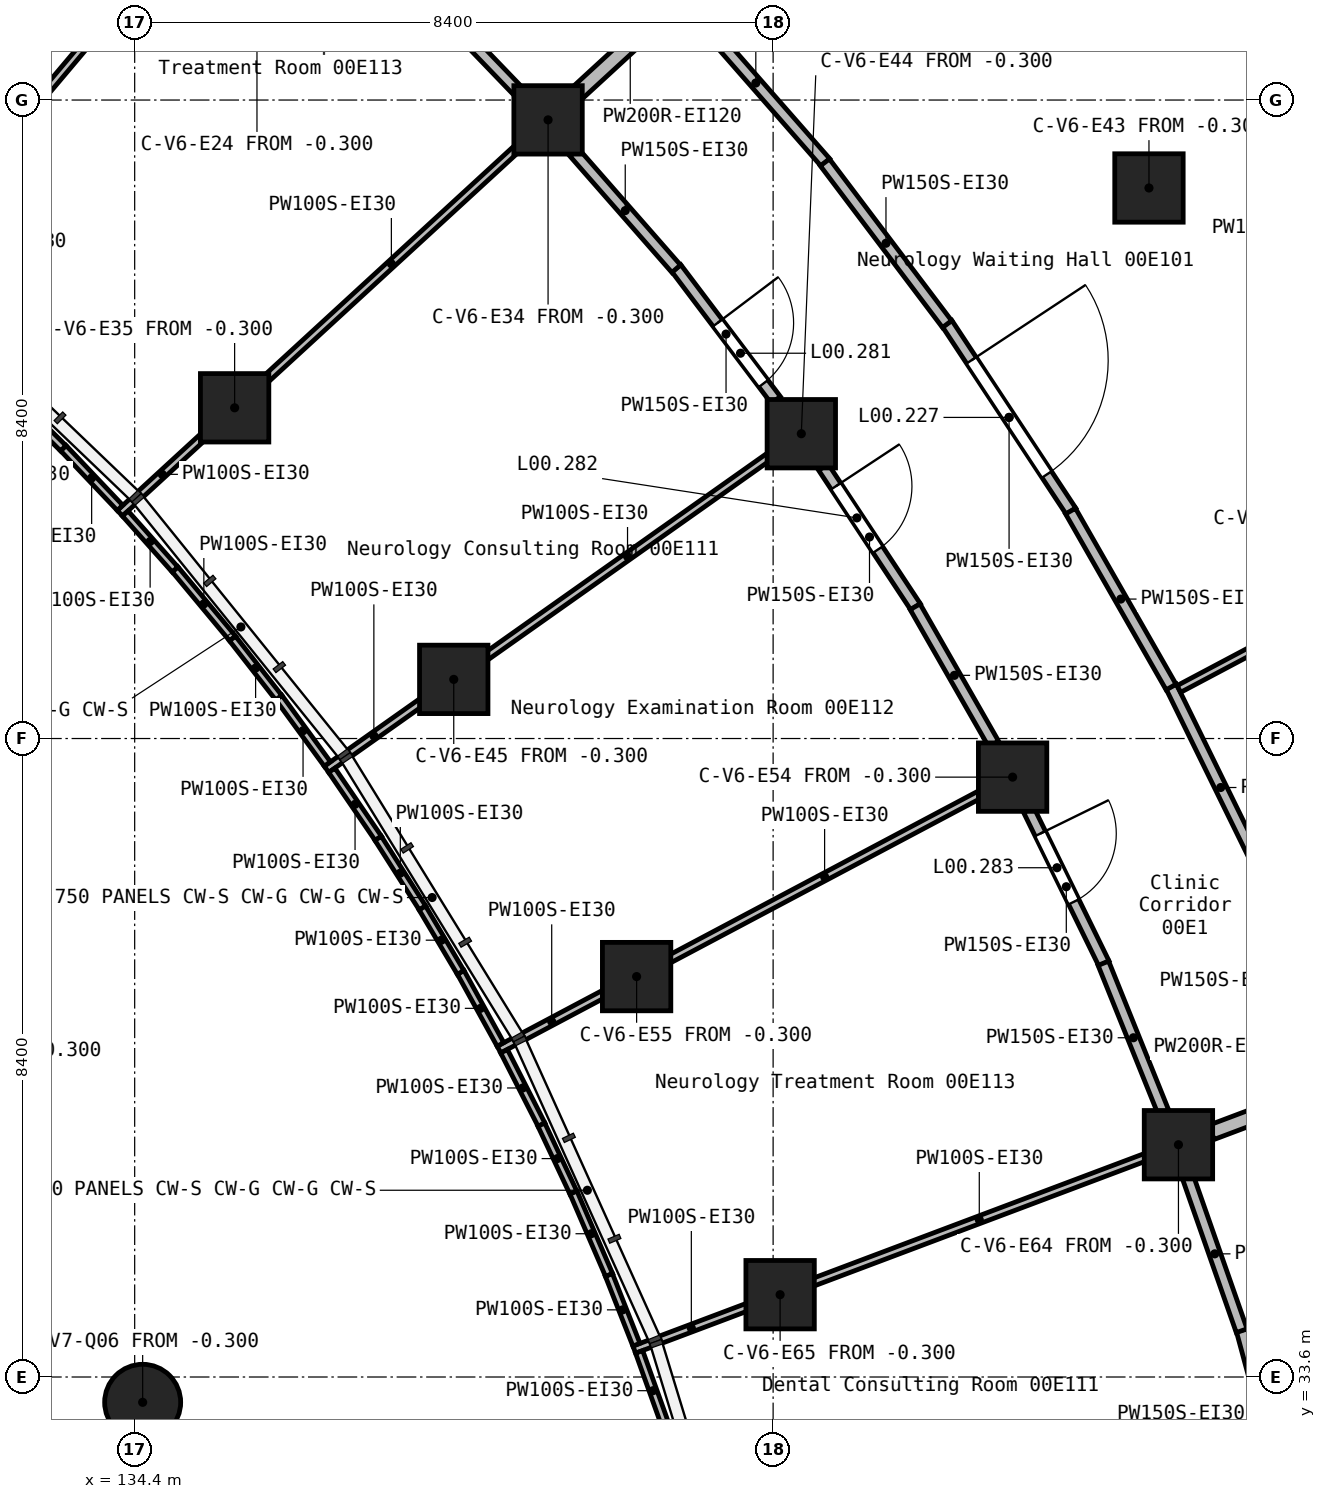
"""IFC4 building model, lengths in metres.
Left out: names, types, materials, properties, quantities, classifications, styles, units other than length and angle.
Written with IfcOpenShell. Run it as: python <this file> out.ifc"""

import sys

from ifc_helpers import new_model, si_unit, direction, frame, frame_2d, origin, origin_2d, place, context, subcontext, project, spatial, rectangle, circle, extrude, element, fill, save


model = new_model("IFC4")
c1 = context("Model", 3, precision=1e-05, world=origin(), true_north=direction((0.0, 1.0)))
c2 = subcontext(c1, "Body", "Model", "MODEL_VIEW")
j1 = project(units=[si_unit("LENGTHUNIT", "METRE"), si_unit("PLANEANGLEUNIT", "RADIAN")], contexts=[c1])
p1 = place(None, origin())
s1 = spatial("IfcSite", under=j1, at=p1, CompositionType="ELEMENT")
p2 = place(p1, origin())
s2 = spatial("IfcBuilding", under=s1, at=p2, CompositionType="ELEMENT")
p3 = place(p2, origin())
s3 = spatial("IfcBuildingStorey", under=s2, at=p3, CompositionType="ELEMENT", Elevation=0.0)
p4 = place(p3, frame((134.505, 33.267, -0.3), z_axis=(0.0, 0.0, 1.0), x_axis=(1.0, 0.0, 0.0)))
e1 = element("IfcColumn", 1, at=p4, inside=s3, PredefinedType="COLUMN", context=c2, shape_type="SweptSolid", body=[
    extrude(circle(Radius=0.5, at=origin_2d()), origin(), (0.0, 0.0, 1.0), 5.7),
])
for number, where, z_axis, x_axis in (
    (2, (135.715, 46.351, -0.3), (0.0, 0.0, 1.0), (1.0, 0.0, 0.0)),
    (3, (138.598, 42.778, -0.3), (0.0, 0.0, 1.0), (1.0, 0.0, 0.0)),
    (4, (139.839, 50.139, -0.3), (0.0, 0.0, 1.0), (1.0, 0.0, 0.0)),
    (5, (141.004, 38.868, -0.3), (0.0, 0.0, 1.0), (1.0, 0.0, 0.0)),
    (6, (142.892, 34.683, -0.3), (0.0, 0.0, 1.0), (1.0, 0.0, 0.0)),
    (7, (143.171, 46.01, -0.3), (0.0, 0.0, 1.0), (1.0, 0.0, 0.0)),
    (8, (145.951, 41.492, -0.3), (0.0, 0.0, 1.0), (1.0, 0.0, 0.0)),
    (9, (147.745, 49.243, -0.3), (0.0, 0.0, 1.0), (1.0, 0.0, 0.0)),
    (10, (148.133, 36.656, -0.3), (0.0, 0.0, 1.0), (1.0, 0.0, 0.0)),
):
    element("IfcColumn", number, at=place(p3, frame(where, z_axis=z_axis, x_axis=x_axis)), inside=s3, PredefinedType="COLUMN", context=c2, shape_type="SweptSolid", body=[
        extrude(rectangle(XDim=0.9, YDim=0.9, at=origin_2d()), origin(), (0.0, 0.0, 1.0), 5.7),
    ])
p5 = place(p3, frame((140.196, 50.467, 0.0), z_axis=(0.0, 0.0, 1.0), x_axis=(0.736519787736, 0.676415997943, 0.0)))
e11 = element("IfcWall", 11, at=p5, inside=s3, PredefinedType="SOLIDWALL", context=c2, shape_type="SweptSolid", body=[
    extrude(rectangle(XDim=1.966, YDim=0.2, at=frame_2d((0.983, 0.0))), origin(), (0.0, 0.0, 1.0), 5.05),
])
p6 = place(p3, frame((148.567, 36.819, 0.0), z_axis=(0.0, 0.0, 1.0), x_axis=(0.935934561344, 0.352173958268, 0.0)))
e12 = element("IfcWall", 12, at=p6, inside=s3, PredefinedType="SOLIDWALL", context=c2, shape_type="SweptSolid", body=[
    extrude(rectangle(XDim=1.986, YDim=0.2, at=frame_2d((0.993, 0.0))), origin(), (0.0, 0.0, 1.0), 5.05),
])
p7 = place(p3, frame((148.038, 42.683, 0.0), z_axis=(0.0, 0.0, 1.0), x_axis=(0.440200278942, -0.897899612663, 0.0)))
e13 = element("IfcWall", 13, at=p7, inside=s3, PredefinedType="PARTITIONING", context=c2, shape_type="SweptSolid", body=[
    extrude(rectangle(XDim=2.958, YDim=0.15, at=frame_2d((1.479, 0.0))), origin(), (0.0, 0.0, 1.0), 5.05),
])
p8 = place(p3, frame((145.09, 47.458, 0.0), z_axis=(0.0, 0.0, 1.0), x_axis=(0.551018151494, -0.834493257447, 0.0)))
e14 = element("IfcWall", 14, at=p8, inside=s3, PredefinedType="PARTITIONING", context=c2, shape_type="SweptSolid", body=[
    extrude(rectangle(XDim=2.958, YDim=0.15, at=frame_2d((1.479, 0.0))), origin(), (0.0, 0.0, 1.0), 5.05),
])
p9 = place(p8, frame((0.579, 0.0, 0.0)))
e15 = element("IfcOpeningElement", 15, at=p9, cuts=e14, PredefinedType="OPENING", context=c2, shape_type="SweptSolid", body=[
    extrude(rectangle(XDim=1.8, YDim=2.1, at=frame_2d((0.9, 1.05))), frame((0.0, 0.085, 0.0), z_axis=(0.0, -1.0, 0.0), x_axis=(1.0, 0.0, 0.0)), (0.0, 0.0, 1.0), 0.17),
])
p10 = place(p3, frame((146.713, 44.992, 0.0), z_axis=(0.0, 0.0, 1.0), x_axis=(0.49622768999, -0.868192420888, 0.0)))
e16 = element("IfcWall", 16, at=p10, inside=s3, PredefinedType="PARTITIONING", context=c2, shape_type="SweptSolid", body=[
    extrude(rectangle(XDim=2.666, YDim=0.15, at=frame_2d((1.333, 0.0))), origin(), (0.0, 0.0, 1.0), 5.05),
])
p11 = place(p3, frame((141.656, 51.669, 0.0), z_axis=(0.0, 0.0, 1.0), x_axis=(0.659076402407, -0.752075990702, 0.0)))
e17 = element("IfcWall", 17, at=p11, inside=s3, PredefinedType="PARTITIONING", context=c2, shape_type="SweptSolid", body=[
    extrude(rectangle(XDim=2.78, YDim=0.15, at=frame_2d((1.39, 0.0))), origin(), (0.0, 0.0, 1.0), 5.05),
])
p12 = place(p3, frame((143.481, 49.579, 0.0), z_axis=(0.0, 0.0, 1.0), x_axis=(0.602824021104, -0.797874175281, 0.0)))
e18 = element("IfcWall", 18, at=p12, inside=s3, PredefinedType="PARTITIONING", context=c2, shape_type="SweptSolid", body=[
    extrude(rectangle(XDim=2.666, YDim=0.15, at=frame_2d((1.333, 0.0))), origin(), (0.0, 0.0, 1.0), 5.05),
])
p13 = place(p3, frame((146.163, 41.06, 0.0), z_axis=(0.0, 0.0, 1.0), x_axis=(0.439946079235, -0.898024190858, 0.0)))
e19 = element("IfcWall", 19, at=p13, inside=s3, PredefinedType="PARTITIONING", context=c2, shape_type="SweptSolid", body=[
    extrude(rectangle(XDim=2.249, YDim=0.15, at=frame_2d((1.124, 0.0))), origin(), (0.0, 0.0, 1.0), 5.05),
])
p14 = place(p13, frame((0.346, 0.0, 0.0)))
e20 = element("IfcOpeningElement", 20, at=p14, cuts=e19, PredefinedType="OPENING", context=c2, shape_type="SweptSolid", body=[
    extrude(rectangle(XDim=1.0, YDim=2.1, at=frame_2d((0.5, 1.05))), frame((0.0, 0.085, 0.0), z_axis=(0.0, -1.0, 0.0), x_axis=(1.0, 0.0, 0.0)), (0.0, 0.0, 1.0), 0.17),
])
p15 = place(p3, frame((141.526, 48.188, 0.0), z_axis=(0.0, 0.0, 1.0), x_axis=(0.60280129331, -0.797891346477, 0.0)))
e21 = element("IfcWall", 21, at=p15, inside=s3, PredefinedType="PARTITIONING", context=c2, shape_type="SweptSolid", body=[
    extrude(rectangle(XDim=2.172, YDim=0.15, at=frame_2d((1.086, 0.0))), origin(), (0.0, 0.0, 1.0), 5.05),
])
p16 = place(p15, frame((0.902, 0.0, 0.0)))
e22 = element("IfcOpeningElement", 22, at=p16, cuts=e21, PredefinedType="OPENING", context=c2, shape_type="SweptSolid", body=[
    extrude(rectangle(XDim=1.0, YDim=2.1, at=frame_2d((0.5, 1.05))), frame((0.0, 0.085, 0.0), z_axis=(0.0, -1.0, 0.0), x_axis=(1.0, 0.0, 0.0)), (0.0, 0.0, 1.0), 0.17),
])
p17 = place(p3, frame((148.969, 34.215, 0.0), z_axis=(0.0, 0.0, 1.0), x_axis=(0.26138863195, -0.965233641709, 0.0)))
e23 = element("IfcWall", 23, at=p17, inside=s3, PredefinedType="PARTITIONING", context=c2, shape_type="SweptSolid", body=[
    extrude(rectangle(XDim=2.295, YDim=0.15, at=frame_2d((1.147, 0.0))), origin(), (0.0, 0.0, 1.0), 5.05),
])
p18 = place(p17, frame((0.902, 0.0, 0.0)))
e24 = element("IfcOpeningElement", 24, at=p18, cuts=e23, PredefinedType="OPENING", context=c2, shape_type="SweptSolid", body=[
    extrude(rectangle(XDim=1.0, YDim=2.1, at=frame_2d((0.5, 1.05))), frame((0.0, 0.085, 0.0), z_axis=(0.0, -1.0, 0.0), x_axis=(1.0, 0.0, 0.0)), (0.0, 0.0, 1.0), 0.17),
])
p19 = place(p3, frame((143.462, 45.57, 0.0), z_axis=(0.0, 0.0, 1.0), x_axis=(0.550880835548, -0.834583911315, 0.0)))
e25 = element("IfcWall", 25, at=p19, inside=s3, PredefinedType="PARTITIONING", context=c2, shape_type="SweptSolid", body=[
    extrude(rectangle(XDim=2.201, YDim=0.15, at=frame_2d((1.101, 0.0))), origin(), (0.0, 0.0, 1.0), 5.05),
])
p20 = place(p19, frame((0.299, 0.0, 0.0)))
e26 = element("IfcOpeningElement", 26, at=p20, cuts=e25, PredefinedType="OPENING", context=c2, shape_type="SweptSolid", body=[
    extrude(rectangle(XDim=1.0, YDim=2.1, at=frame_2d((0.5, 1.05))), frame((0.0, 0.085, 0.0), z_axis=(0.0, -1.0, 0.0), x_axis=(1.0, 0.0, 0.0)), (0.0, 0.0, 1.0), 0.17),
])
p21 = place(p3, frame((144.668, 43.734, 0.0), z_axis=(0.0, 0.0, 1.0), x_axis=(0.496694973164, -0.867925171679, 0.0)))
e27 = element("IfcWall", 27, at=p21, inside=s3, PredefinedType="PARTITIONING", context=c2, shape_type="SweptSolid", body=[
    extrude(rectangle(XDim=2.08, YDim=0.15, at=frame_2d((1.04, 0.0))), origin(), (0.0, 0.0, 1.0), 5.05),
])
p22 = place(p3, frame((147.145, 39.043, 0.0), z_axis=(0.0, 0.0, 1.0), x_axis=(0.373899406404, -0.927469263043, 0.0)))
e28 = element("IfcWall", 28, at=p22, inside=s3, PredefinedType="PARTITIONING", context=c2, shape_type="SweptSolid", body=[
    extrude(rectangle(XDim=2.113, YDim=0.15, at=frame_2d((1.057, 0.0))), origin(), (0.0, 0.0, 1.0), 5.05),
])
p23 = place(p3, frame((148.257, 36.232, 0.0), z_axis=(0.0, 0.0, 1.0), x_axis=(0.330477279651, -0.943813947574, 0.0)))
e29 = element("IfcWall", 29, at=p23, inside=s3, PredefinedType="PARTITIONING", context=c2, shape_type="SweptSolid", body=[
    extrude(rectangle(XDim=2.143, YDim=0.15, at=frame_2d((1.072, 0.0))), origin(), (0.0, 0.0, 1.0), 5.05),
])
p24 = place(p3, frame((140.184, 49.71, 0.0), z_axis=(0.0, 0.0, 1.0), x_axis=(0.659209376091, -0.751959439381, 0.0)))
e30 = element("IfcWall", 30, at=p24, inside=s3, PredefinedType="PARTITIONING", context=c2, shape_type="SweptSolid", body=[
    extrude(rectangle(XDim=2.035, YDim=0.15, at=frame_2d((1.017, 0.0))), origin(), (0.0, 0.0, 1.0), 5.05),
])
p25 = place(p3, frame((138.031, 51.985, 0.0), z_axis=(0.0, 0.0, 1.0), x_axis=(0.693216793474, -0.7207291289, 0.0)))
e31 = element("IfcWall", 31, at=p25, inside=s3, PredefinedType="PARTITIONING", context=c2, shape_type="SweptSolid", body=[
    extrude(rectangle(XDim=2.076, YDim=0.15, at=frame_2d((1.038, 0.0))), origin(), (0.0, 0.0, 1.0), 5.05),
])
p26 = place(p3, frame((148.599, 52.122, 0.0), z_axis=(0.0, 0.0, 1.0), x_axis=(0.595875663086, -0.803076705017, 0.0)))
e32 = element("IfcWall", 32, at=p26, inside=s3, PredefinedType="PARTITIONING", context=c2, shape_type="SweptSolid", body=[
    extrude(rectangle(XDim=1.414, YDim=0.15, at=frame_2d((0.707, 0.0))), origin(), (0.0, 0.0, 1.0), 5.05),
])
p27 = place(p3, frame((132.762, 49.958, 0.0), z_axis=(0.0, 0.0, 1.0), x_axis=(0.644429680937, 0.76466357722, 0.0)))
e33 = element("IfcWall", 33, at=p27, inside=s3, PredefinedType="PARTITIONING", context=c2, shape_type="SweptSolid", body=[
    extrude(rectangle(XDim=4.475, YDim=0.1, at=frame_2d((2.238, 0.0))), origin(), (0.0, 0.0, 1.0), 5.05),
])
p28 = place(p3, frame((139.193, 37.908, 0.0), z_axis=(0.0, 0.0, 1.0), x_axis=(0.883481589726, 0.468465879884, 0.0)))
e34 = element("IfcWall", 34, at=p28, inside=s3, PredefinedType="PARTITIONING", context=c2, shape_type="SweptSolid", body=[
    extrude(rectangle(XDim=1.571, YDim=0.1, at=frame_2d((0.786, 0.0))), origin(), (0.0, 0.0, 1.0), 5.05),
])
p29 = place(p3, frame((141.427, 39.093, 0.0), z_axis=(0.0, 0.0, 1.0), x_axis=(0.88344099274, 0.46854243388, 0.0)))
e35 = element("IfcWall", 35, at=p29, inside=s3, PredefinedType="PARTITIONING", context=c2, shape_type="SweptSolid", body=[
    extrude(rectangle(XDim=4.642, YDim=0.1, at=frame_2d((2.321, 0.0))), origin(), (0.0, 0.0, 1.0), 5.05),
])
p30 = place(p3, frame((136.924, 41.595, 0.0), z_axis=(0.0, 0.0, 1.0), x_axis=(0.816643847366, 0.577141946629, 0.0)))
e36 = element("IfcWall", 36, at=p30, inside=s3, PredefinedType="PARTITIONING", context=c2, shape_type="SweptSolid", body=[
    extrude(rectangle(XDim=1.525, YDim=0.1, at=frame_2d((0.762, 0.0))), origin(), (0.0, 0.0, 1.0), 5.05),
])
p31 = place(p3, frame((139.026, 43.081, 0.0), z_axis=(0.0, 0.0, 1.0), x_axis=(0.816637661001, 0.577150700108, 0.0)))
e37 = element("IfcWall", 37, at=p31, inside=s3, PredefinedType="PARTITIONING", context=c2, shape_type="SweptSolid", body=[
    extrude(rectangle(XDim=4.551, YDim=0.1, at=frame_2d((2.275, 0.0))), origin(), (0.0, 0.0, 1.0), 5.05),
])
p32 = place(p3, frame((140.973, 33.96, 0.0), z_axis=(0.0, 0.0, 1.0), x_axis=(0.935890679388, 0.35229055655, 0.0)))
e38 = element("IfcWall", 38, at=p32, inside=s3, PredefinedType="PARTITIONING", context=c2, shape_type="SweptSolid", body=[
    extrude(rectangle(XDim=1.604, YDim=0.1, at=frame_2d((0.802, 0.0))), origin(), (0.0, 0.0, 1.0), 5.05),
])
p33 = place(p3, frame((143.309, 34.84, 0.0), z_axis=(0.0, 0.0, 1.0), x_axis=(0.935891610639, 0.352288082591, 0.0)))
e39 = element("IfcWall", 39, at=p33, inside=s3, PredefinedType="PARTITIONING", context=c2, shape_type="SweptSolid", body=[
    extrude(rectangle(XDim=4.708, YDim=0.1, at=frame_2d((2.354, 0.0))), origin(), (0.0, 0.0, 1.0), 5.05),
])
p34 = place(p3, frame((134.205, 44.964, 0.0), z_axis=(0.0, 0.0, 1.0), x_axis=(0.736497059378, 0.676440745023, 0.0)))
e40 = element("IfcWall", 40, at=p34, inside=s3, PredefinedType="PARTITIONING", context=c2, shape_type="SweptSolid", body=[
    extrude(rectangle(XDim=1.512, YDim=0.1, at=frame_2d((0.756, 0.0))), origin(), (0.0, 0.0, 1.0), 5.05),
])
p35 = place(p3, frame((136.111, 46.715, 0.0), z_axis=(0.0, 0.0, 1.0), x_axis=(0.736475017651, 0.676464742892, 0.0)))
e41 = element("IfcWall", 41, at=p35, inside=s3, PredefinedType="PARTITIONING", context=c2, shape_type="SweptSolid", body=[
    extrude(rectangle(XDim=4.524, YDim=0.1, at=frame_2d((2.262, 0.0))), origin(), (0.0, 0.0, 1.0), 5.05),
])
p36 = place(p3, frame((148.139, 42.652, 0.0), z_axis=(0.0, 0.0, 1.0), x_axis=(0.883500310686, 0.468430572249, 0.0)))
e42 = element("IfcWall", 42, at=p36, inside=s3, PredefinedType="PARTITIONING", context=c2, shape_type="SweptSolid", body=[
    extrude(rectangle(XDim=2.645, YDim=0.1, at=frame_2d((1.322, 0.0))), origin(), (0.0, 0.0, 1.0), 5.05),
])
p37 = place(p3, frame((139.26, 37.886, 0.0), z_axis=(0.0, 0.0, 1.0), x_axis=(0.454222477174, -0.890888287738, 0.0)))
e43 = element("IfcWall", 43, at=p37, inside=s3, PredefinedType="PARTITIONING", context=c2, shape_type="SweptSolid", body=[
    extrude(rectangle(XDim=1.085, YDim=0.1, at=frame_2d((0.542, 0.0))), origin(), (0.0, 0.0, 1.0), 5.05),
])
for number, where, z_axis, x_axis in (
    (44, (133.461, 45.821, 0.0), (0.0, 0.0, 1.0), (0.688, -0.725, 0.0)),
    (45, (136.994, 41.582, 0.0), (0.0, 0.0, 1.0), (0.564, -0.826, 0.0)),
):
    element("IfcWall", number, at=place(p3, frame(where, z_axis=z_axis, x_axis=x_axis)), inside=s3, PredefinedType="PARTITIONING", context=c2, shape_type="SweptSolid", body=[
        extrude(rectangle(XDim=1.084, YDim=0.1, at=frame_2d((0.542, 0.0))), origin(), (0.0, 0.0, 1.0), 5.05),
    ])
p38 = place(p3, frame((134.931, 44.226, 0.0), z_axis=(0.0, 0.0, 1.0), x_axis=(0.639778970268, -0.768558956231, 0.0)))
e46 = element("IfcWall", 46, at=p38, inside=s3, PredefinedType="PARTITIONING", context=c2, shape_type="SweptSolid", body=[
    extrude(rectangle(XDim=1.185, YDim=0.1, at=frame_2d((0.592, 0.0))), origin(), (0.0, 0.0, 1.0), 5.05),
])
p39 = place(p3, frame((137.603, 40.687, 0.0), z_axis=(0.0, 0.0, 1.0), x_axis=(0.53747146193, -0.843281938388, 0.0)))
e47 = element("IfcWall", 47, at=p39, inside=s3, PredefinedType="PARTITIONING", context=c2, shape_type="SweptSolid", body=[
    extrude(rectangle(XDim=1.086, YDim=0.1, at=frame_2d((0.543, 0.0))), origin(), (0.0, 0.0, 1.0), 5.05),
])
for number, where, z_axis, x_axis in (
    (48, (138.689, 38.925, 0.0), (0.0, 0.0, 1.0), (0.483, -0.876, 0.0)),
    (49, (136.295, 42.54, 0.0), (0.0, 0.0, 1.0), (0.59, -0.807, 0.0)),
):
    element("IfcWall", number, at=place(p3, frame(where, z_axis=z_axis, x_axis=x_axis)), inside=s3, PredefinedType="PARTITIONING", context=c2, shape_type="SweptSolid", body=[
        extrude(rectangle(XDim=1.084, YDim=0.1, at=frame_2d((0.542, 0.0))), origin(), (0.0, 0.0, 1.0), 5.05),
    ])
p40 = place(p3, frame((140.172, 36.029, 0.0), z_axis=(0.0, 0.0, 1.0), x_axis=(0.396479436871, -0.918043602526, 0.0)))
e50 = element("IfcWall", 50, at=p40, inside=s3, PredefinedType="PARTITIONING", context=c2, shape_type="SweptSolid", body=[
    extrude(rectangle(XDim=1.185, YDim=0.1, at=frame_2d((0.592, 0.0))), origin(), (0.0, 0.0, 1.0), 5.05),
])
p41 = place(p3, frame((132.758, 46.514, 0.0), z_axis=(0.0, 0.0, 1.0), x_axis=(0.710804317615, -0.703389808043, 0.0)))
e51 = element("IfcWall", 51, at=p41, inside=s3, PredefinedType="PARTITIONING", context=c2, shape_type="SweptSolid", body=[
    extrude(rectangle(XDim=0.988, YDim=0.1, at=frame_2d((0.494, 0.0))), origin(), (0.0, 0.0, 1.0), 5.05),
])
p42 = place(p3, frame((140.64, 34.942, 0.0), z_axis=(0.0, 0.0, 1.0), x_axis=(0.366901413892, -0.93025983063, 0.0)))
e52 = element("IfcWall", 52, at=p42, inside=s3, PredefinedType="PARTITIONING", context=c2, shape_type="SweptSolid", body=[
    extrude(rectangle(XDim=0.986, YDim=0.1, at=frame_2d((0.493, 0.0))), origin(), (0.0, 0.0, 1.0), 5.05),
])
p43 = place(p3, frame((141.037, 33.93, 0.0), z_axis=(0.0, 0.0, 1.0), x_axis=(0.337434932816, -0.941348854631, 0.0)))
e53 = element("IfcWall", 53, at=p43, inside=s3, PredefinedType="PARTITIONING", context=c2, shape_type="SweptSolid", body=[
    extrude(rectangle(XDim=1.084, YDim=0.1, at=frame_2d((0.542, 0.0))), origin(), (0.0, 0.0, 1.0), 5.05),
])
p44 = place(p3, frame((134.276, 44.96, 0.0), z_axis=(0.0, 0.0, 1.0), x_axis=(0.66477897218, -0.747040104779, 0.0)))
e54 = element("IfcWall", 54, at=p44, inside=s3, PredefinedType="PARTITIONING", context=c2, shape_type="SweptSolid", body=[
    extrude(rectangle(XDim=0.985, YDim=0.1, at=frame_2d((0.493, 0.0))), origin(), (0.0, 0.0, 1.0), 5.05),
])
for number, where, z_axis, x_axis in (
    (55, (139.751, 36.92, 0.0), (0.0, 0.0, 1.0), (0.426, -0.905, 0.0)),
    (56, (135.687, 43.316, 0.0), (0.0, 0.0, 1.0), (0.616, -0.788, 0.0)),
):
    element("IfcWall", number, at=place(p3, frame(where, z_axis=z_axis, x_axis=x_axis)), inside=s3, PredefinedType="PARTITIONING", context=c2, shape_type="SweptSolid", body=[
        extrude(rectangle(XDim=0.987, YDim=0.1, at=frame_2d((0.494, 0.0))), origin(), (0.0, 0.0, 1.0), 5.05),
    ])
p45 = place(p3, frame((138.185, 39.771, 0.0), z_axis=(0.0, 0.0, 1.0), x_axis=(0.51019570921, -0.860058334245, 0.0)))
e57 = element("IfcWall", 57, at=p45, inside=s3, PredefinedType="PARTITIONING", context=c2, shape_type="SweptSolid", body=[
    extrude(rectangle(XDim=0.987, YDim=0.1, at=frame_2d((0.493, 0.0))), origin(), (0.0, 0.0, 1.0), 5.05),
])
p46 = place(p9, frame((1.8, 0.0, 0.0), z_axis=(0.0, 0.0, 1.0), x_axis=(-1.0, 0.0, 0.0)))
e58 = element("IfcDoor", 58, at=p46, inside=s3, OperationType="DOUBLE_DOOR_SINGLE_SWING", PredefinedType="DOOR", context=c2, shape_type="SweptSolid", body=[
    extrude(rectangle(XDim=1.8, YDim=2.1, at=frame_2d((0.9, 1.05))), frame((0.0, 0.025, 0.0), z_axis=(0.0, -1.0, 0.0), x_axis=(1.0, 0.0, 0.0)), (0.0, 0.0, 1.0), 0.05),
])
fill(e15, e58)
p47 = place(p16, frame((1.0, 0.0, 0.0), z_axis=(0.0, 0.0, 1.0), x_axis=(-1.0, 0.0, 0.0)))
e59 = element("IfcDoor", 59, at=p47, inside=s3, OperationType="SINGLE_SWING_LEFT", PredefinedType="DOOR", context=c2, shape_type="SweptSolid", body=[
    extrude(rectangle(XDim=1.0, YDim=2.1, at=frame_2d((0.5, 1.05))), frame((0.0, 0.025, 0.0), z_axis=(0.0, -1.0, 0.0), x_axis=(1.0, 0.0, 0.0)), (0.0, 0.0, 1.0), 0.05),
])
fill(e22, e59)
p48 = place(p20, frame((1.0, 0.0, 0.0), z_axis=(0.0, 0.0, 1.0), x_axis=(-1.0, 0.0, 0.0)))
e60 = element("IfcDoor", 60, at=p48, inside=s3, OperationType="SINGLE_SWING_RIGHT", PredefinedType="DOOR", context=c2, shape_type="SweptSolid", body=[
    extrude(rectangle(XDim=1.0, YDim=2.1, at=frame_2d((0.5, 1.05))), frame((0.0, 0.025, 0.0), z_axis=(0.0, -1.0, 0.0), x_axis=(1.0, 0.0, 0.0)), (0.0, 0.0, 1.0), 0.05),
])
fill(e26, e60)
p49 = place(p14, frame((1.0, 0.0, 0.0), z_axis=(0.0, 0.0, 1.0), x_axis=(-1.0, 0.0, 0.0)))
e61 = element("IfcDoor", 61, at=p49, inside=s3, OperationType="SINGLE_SWING_RIGHT", PredefinedType="DOOR", context=c2, shape_type="SweptSolid", body=[
    extrude(rectangle(XDim=1.0, YDim=2.1, at=frame_2d((0.5, 1.05))), frame((0.0, 0.025, 0.0), z_axis=(0.0, -1.0, 0.0), x_axis=(1.0, 0.0, 0.0)), (0.0, 0.0, 1.0), 0.05),
])
fill(e20, e61)
save(model, sys.argv[1])
